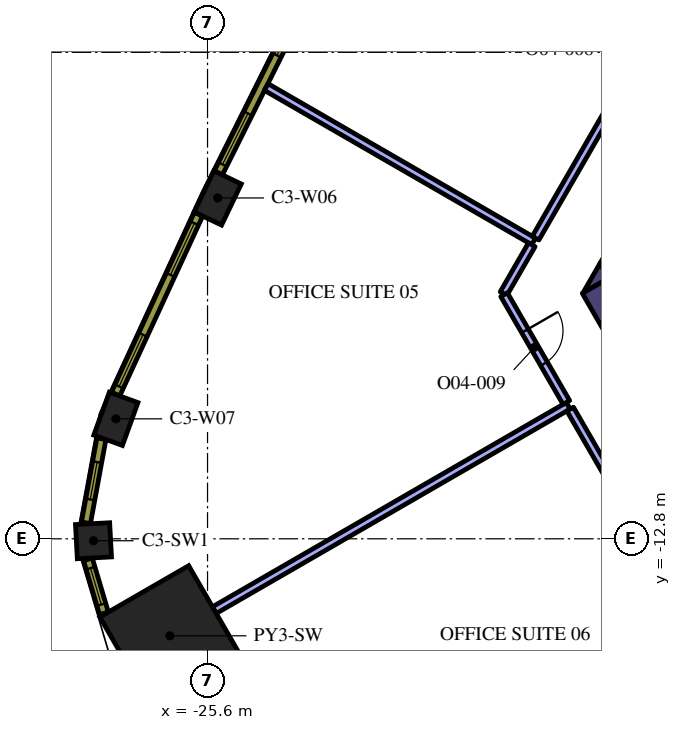
"""IFC4 building model, lengths in metres.
Left out: names, types, materials, properties, quantities, classifications, styles, units other than length and angle.
Written with IfcOpenShell. Run it as: python <this file> out.ifc"""

import sys

from ifc_helpers import new_model, si_unit, direction, frame, frame_2d, origin, origin_2d, place, context, subcontext, project, spatial, polyline, rectangle, outline, extrude, element, fill, save


model = new_model("IFC4")
c1 = context("Model", 3, precision=1e-05, world=origin(), true_north=direction((0.0, 1.0)))
c2 = subcontext(c1, "Body", "Model", "MODEL_VIEW")
j1 = project(units=[si_unit("LENGTHUNIT", "METRE"), si_unit("PLANEANGLEUNIT", "RADIAN")], contexts=[c1])
p1 = place(None, origin())
s1 = spatial("IfcSite", under=j1, at=p1, CompositionType="ELEMENT")
p2 = place(p1, origin())
s2 = spatial("IfcBuilding", under=s1, at=p2, CompositionType="ELEMENT")
p3 = place(p2, frame((0.0, 0.0, 187.8)))
s3 = spatial("IfcBuildingStorey", under=s2, at=p3, CompositionType="ELEMENT", Elevation=187.8)
p4 = place(p3, frame((-26.591, -15.352, 0.0), z_axis=(0.0, 0.0, 1.0), x_axis=(-0.866025403784, -0.5, 0.0)))
e1 = element("IfcColumn", 1, at=p4, inside=s3, PredefinedType="COLUMN", context=c2, shape_type="SweptSolid", body=[
    extrude(rectangle(XDim=2.7, YDim=2.7, at=origin_2d()), origin(), (0.0, 0.0, 1.0), 4.2),
])
for number, where, z_axis, x_axis in (
    (2, (-25.332, -3.832, 0.0), (0.0, 0.0, 1.0), (-0.433, -0.902, 0.0)),
    (3, (-28.012, -9.644, 0.0), (0.0, 0.0, 1.0), (-0.341, -0.94, 0.0)),
):
    element("IfcColumn", number, at=place(p3, frame(where, z_axis=z_axis, x_axis=x_axis)), inside=s3, PredefinedType="COLUMN", context=c2, shape_type="SweptSolid", body=[
        extrude(rectangle(XDim=1.2, YDim=0.8, at=origin_2d()), origin(), (0.0, 0.0, 1.0), 4.2),
    ])
p5 = place(p3, frame((-28.601, -12.851, 0.0), z_axis=(0.0, 0.0, 1.0), x_axis=(0.0533921468, -0.998573622053, 0.0)))
e4 = element("IfcColumn", 4, at=p5, inside=s3, PredefinedType="COLUMN", context=c2, shape_type="SweptSolid", body=[
    extrude(rectangle(XDim=0.9, YDim=0.9, at=origin_2d()), origin(), (0.0, 0.0, 1.0), 4.2),
])
p6 = place(p3, frame((-15.392, -6.14, 0.0), z_axis=(0.0, 0.0, 1.0), x_axis=(0.499984020225, -0.866034629516, 0.0)))
e5 = element("IfcWall", 5, at=p6, inside=s3, PredefinedType="SOLIDWALL", context=c2, shape_type="SweptSolid", body=[
    extrude(rectangle(XDim=3.824, YDim=0.8, at=frame_2d((1.912, 0.0))), origin(), (0.0, 0.0, 1.0), 4.2),
])
p7 = place(p3, origin())
e6 = element("IfcWall", 6, at=p7, inside=s3, PredefinedType="SOLIDWALL", context=c2, shape_type="SweptSolid", body=[
    extrude(outline(polyline([(-15.047, -5.938), (-15.719, -6.326), (-15.271, -5.55), (-15.047, -5.938)])), origin(), (0.0, 0.0, 1.0), 4.2),
])
p8 = place(p3, frame((-13.518, -3.314, 0.0), z_axis=(0.0, 0.0, 1.0), x_axis=(-0.499969377405, -0.866043083026, 0.0)))
e7 = element("IfcWall", 7, at=p8, inside=s3, PredefinedType="SOLIDWALL", context=c2, shape_type="SweptSolid", body=[
    extrude(rectangle(XDim=2.824, YDim=0.8, at=frame_2d((1.412, 0.0))), origin(), (0.0, 0.0, 1.0), 4.2),
])
e8 = element("IfcWall", 8, at=p7, inside=s3, PredefinedType="SOLIDWALL", context=c2, shape_type="SweptSolid", body=[
    extrude(outline(polyline([(-14.809, -6.35), (-15.257, -5.574), (-14.585, -5.962), (-14.809, -6.35)])), origin(), (0.0, 0.0, 1.0), 4.2),
])
p9 = place(p3, frame((-17.018, -4.976, 0.0), z_axis=(0.0, 0.0, 1.0), x_axis=(-0.866034495264, 0.499984252764, 0.0)))
e9 = element("IfcWall", 9, at=p9, inside=s3, PredefinedType="PARTITIONING", context=c2, shape_type="SweptSolid", body=[
    extrude(rectangle(XDim=8.126, YDim=0.2, at=frame_2d((4.063, 0.0))), origin(), (0.0, 0.0, 1.0), 3.15),
])
p10 = place(p3, frame((-12.374, 3.068, 0.0), z_axis=(0.0, 0.0, 1.0), x_axis=(-0.50000000053, -0.866025403479, 0.0)))
e10 = element("IfcWall", 10, at=p10, inside=s3, PredefinedType="PARTITIONING", context=c2, shape_type="SweptSolid", body=[
    extrude(rectangle(XDim=9.188, YDim=0.2, at=frame_2d((4.594, 0.0))), origin(), (0.0, 0.0, 1.0), 3.15),
])
p11 = place(p10, frame((4.1, 0.0, 0.0)))
e11 = element("IfcOpeningElement", 11, at=p11, cuts=e10, PredefinedType="OPENING", context=c2, shape_type="SweptSolid", body=[
    extrude(rectangle(XDim=1.0, YDim=2.1, at=frame_2d((0.5, 1.05))), frame((0.0, 0.11, 0.0), z_axis=(0.0, -1.0, 0.0), x_axis=(1.0, 0.0, 0.0)), (0.0, 0.0, 1.0), 0.22),
])
p12 = place(p3, frame((-16.108, -9.3, 0.0), z_axis=(0.0, 0.0, 1.0), x_axis=(-0.866027180319, -0.499996922939, 0.0)))
e12 = element("IfcWall", 12, at=p12, inside=s3, PredefinedType="PARTITIONING", context=c2, shape_type="SweptSolid", body=[
    extrude(rectangle(XDim=10.754, YDim=0.2, at=frame_2d((5.377, 0.0))), origin(), (0.0, 0.0, 1.0), 3.15),
])
p13 = place(p3, frame((-17.068, -5.062, 0.0), z_axis=(0.0, 0.0, 1.0), x_axis=(-0.499935638681, -0.86606255962, 0.0)))
e13 = element("IfcWall", 13, at=p13, inside=s3, PredefinedType="PARTITIONING", context=c2, shape_type="SweptSolid", body=[
    extrude(rectangle(XDim=1.487, YDim=0.2, at=frame_2d((0.744, 0.0))), origin(), (0.0, 0.0, 1.0), 3.15),
])
p14 = place(p3, frame((-17.796, -6.376, 0.0), z_axis=(0.0, 0.0, 1.0), x_axis=(0.500001965626, -0.866024268927, 0.0)))
e14 = element("IfcWall", 14, at=p14, inside=s3, PredefinedType="PARTITIONING", context=c2, shape_type="SweptSolid", body=[
    extrude(rectangle(XDim=3.276, YDim=0.2, at=frame_2d((1.638, 0.0))), origin(), (0.0, 0.0, 1.0), 3.15),
])
p15 = place(p14, frame((1.1, 0.0, 0.0)))
e15 = element("IfcOpeningElement", 15, at=p15, cuts=e14, PredefinedType="OPENING", context=c2, shape_type="SweptSolid", body=[
    extrude(rectangle(XDim=1.0, YDim=2.1, at=frame_2d((0.5, 1.05))), frame((0.0, 0.11, 0.0), z_axis=(0.0, -1.0, 0.0), x_axis=(1.0, 0.0, 0.0)), (0.0, 0.0, 1.0), 0.22),
])
p16 = place(p3, frame((-16.058, -9.387, 0.0), z_axis=(0.0, 0.0, 1.0), x_axis=(0.500046299512, -0.865998671098, 0.0)))
e16 = element("IfcWall", 16, at=p16, inside=s3, PredefinedType="PARTITIONING", context=c2, shape_type="SweptSolid", body=[
    extrude(rectangle(XDim=3.306, YDim=0.2, at=frame_2d((1.653, 0.0))), origin(), (0.0, 0.0, 1.0), 3.15),
])
p17 = place(p3, frame((-22.994, 1.485, 0.0), z_axis=(0.0, 0.0, 1.0), x_axis=(-0.446256171312, -0.8949052629, 0.0)))
e17 = element("IfcWall", 17, at=p17, inside=s3, PredefinedType="SOLIDWALL", context=c2, shape_type="SweptSolid", body=[
    extrude(rectangle(XDim=5.203, YDim=0.24, at=frame_2d((2.602, 0.0))), origin(), (0.0, 0.0, 1.0), 3.95),
])
p18 = place(p17, frame((0.248, 0.0, 0.9)))
e18 = element("IfcOpeningElement", 18, at=p18, cuts=e17, PredefinedType="OPENING", context=c2, shape_type="SweptSolid", body=[
    extrude(rectangle(XDim=1.5, YDim=2.55, at=frame_2d((0.75, 1.275))), frame((0.0, 0.13, 0.0), z_axis=(0.0, -1.0, 0.0), x_axis=(1.0, 0.0, 0.0)), (0.0, 0.0, 1.0), 0.26),
])
p19 = place(p17, frame((3.455, 0.0, 0.9)))
e19 = element("IfcOpeningElement", 19, at=p19, cuts=e17, PredefinedType="OPENING", context=c2, shape_type="SweptSolid", body=[
    extrude(rectangle(XDim=1.5, YDim=2.55, at=frame_2d((0.75, 1.275))), frame((0.0, 0.13, 0.0), z_axis=(0.0, -1.0, 0.0), x_axis=(1.0, 0.0, 0.0)), (0.0, 0.0, 1.0), 0.26),
])
p20 = place(p3, frame((-25.837, -4.258, 0.0), z_axis=(0.0, 0.0, 1.0), x_axis=(-0.418722559465, -0.908114209885, 0.0)))
e20 = element("IfcWall", 20, at=p20, inside=s3, PredefinedType="SOLIDWALL", context=c2, shape_type="SweptSolid", body=[
    extrude(rectangle(XDim=5.213, YDim=0.24, at=frame_2d((2.606, 0.0))), origin(), (0.0, 0.0, 1.0), 3.95),
])
p21 = place(p20, frame((0.261, 0.0, 0.9)))
e21 = element("IfcOpeningElement", 21, at=p21, cuts=e20, PredefinedType="OPENING", context=c2, shape_type="SweptSolid", body=[
    extrude(rectangle(XDim=1.5, YDim=2.55, at=frame_2d((0.75, 1.275))), frame((0.0, 0.13, 0.0), z_axis=(0.0, -1.0, 0.0), x_axis=(1.0, 0.0, 0.0)), (0.0, 0.0, 1.0), 0.26),
])
p22 = place(p20, frame((3.492, 0.0, 0.9)))
e22 = element("IfcOpeningElement", 22, at=p22, cuts=e20, PredefinedType="OPENING", context=c2, shape_type="SweptSolid", body=[
    extrude(rectangle(XDim=1.5, YDim=2.55, at=frame_2d((0.75, 1.275))), frame((0.0, 0.13, 0.0), z_axis=(0.0, -1.0, 0.0), x_axis=(1.0, 0.0, 0.0)), (0.0, 0.0, 1.0), 0.26),
])
p23 = place(p3, frame((-28.393, -10.167, 0.0), z_axis=(0.0, 0.0, 1.0), x_axis=(-0.180737189259, -0.983531427265, 0.0)))
e23 = element("IfcWall", 23, at=p23, inside=s3, PredefinedType="SOLIDWALL", context=c2, shape_type="SweptSolid", body=[
    extrude(rectangle(XDim=2.25, YDim=0.24, at=frame_2d((1.125, 0.0))), origin(), (0.0, 0.0, 1.0), 3.95),
])
p24 = place(p23, frame((0.625, 0.0, 0.9)))
e24 = element("IfcOpeningElement", 24, at=p24, cuts=e23, PredefinedType="OPENING", context=c2, shape_type="SweptSolid", body=[
    extrude(rectangle(XDim=1.0, YDim=2.55, at=frame_2d((0.5, 1.275))), frame((0.0, 0.13, 0.0), z_axis=(0.0, -1.0, 0.0), x_axis=(1.0, 0.0, 0.0)), (0.0, 0.0, 1.0), 0.26),
])
p25 = place(p3, frame((-28.748, -13.34, 0.0), z_axis=(0.0, 0.0, 1.0), x_axis=(0.284413721403, -0.958701640281, 0.0)))
e25 = element("IfcWall", 25, at=p25, inside=s3, PredefinedType="SOLIDWALL", context=c2, shape_type="SweptSolid", body=[
    extrude(rectangle(XDim=1.482, YDim=0.24, at=frame_2d((0.741, 0.0))), origin(), (0.0, 0.0, 1.0), 3.95),
])
p26 = place(p25, frame((0.241, 0.0, 0.9)))
e26 = element("IfcOpeningElement", 26, at=p26, cuts=e25, PredefinedType="OPENING", context=c2, shape_type="SweptSolid", body=[
    extrude(rectangle(XDim=1.0, YDim=2.55, at=frame_2d((0.5, 1.275))), frame((0.0, 0.13, 0.0), z_axis=(0.0, -1.0, 0.0), x_axis=(1.0, 0.0, 0.0)), (0.0, 0.0, 1.0), 0.26),
])
p27 = place(p15, origin())
e27 = element("IfcDoor", 27, at=p27, inside=s3, OperationType="SINGLE_SWING_LEFT", PredefinedType="DOOR", context=c2, shape_type="SweptSolid", body=[
    extrude(rectangle(XDim=1.0, YDim=2.1, at=frame_2d((0.5, 1.05))), frame((0.0, 0.025, 0.0), z_axis=(0.0, -1.0, 0.0), x_axis=(1.0, 0.0, 0.0)), (0.0, 0.0, 1.0), 0.05),
])
fill(e15, e27)
p28 = place(p18, origin())
e28 = element("IfcWindow", 28, at=p28, inside=s3, PartitioningType="SINGLE_PANEL", PredefinedType="WINDOW", context=c2, shape_type="SweptSolid", body=[
    extrude(rectangle(XDim=1.5, YDim=2.55, at=frame_2d((0.75, 1.275))), frame((0.0, 0.04, 0.0), z_axis=(0.0, -1.0, 0.0), x_axis=(1.0, 0.0, 0.0)), (0.0, 0.0, 1.0), 0.06),
])
fill(e18, e28)
p29 = place(p19, origin())
e29 = element("IfcWindow", 29, at=p29, inside=s3, PartitioningType="SINGLE_PANEL", PredefinedType="WINDOW", context=c2, shape_type="SweptSolid", body=[
    extrude(rectangle(XDim=1.5, YDim=2.55, at=frame_2d((0.75, 1.275))), frame((0.0, 0.04, 0.0), z_axis=(0.0, -1.0, 0.0), x_axis=(1.0, 0.0, 0.0)), (0.0, 0.0, 1.0), 0.06),
])
fill(e19, e29)
p30 = place(p21, origin())
e30 = element("IfcWindow", 30, at=p30, inside=s3, PartitioningType="SINGLE_PANEL", PredefinedType="WINDOW", context=c2, shape_type="SweptSolid", body=[
    extrude(rectangle(XDim=1.5, YDim=2.55, at=frame_2d((0.75, 1.275))), frame((0.0, 0.04, 0.0), z_axis=(0.0, -1.0, 0.0), x_axis=(1.0, 0.0, 0.0)), (0.0, 0.0, 1.0), 0.06),
])
fill(e21, e30)
p31 = place(p22, origin())
e31 = element("IfcWindow", 31, at=p31, inside=s3, PartitioningType="SINGLE_PANEL", PredefinedType="WINDOW", context=c2, shape_type="SweptSolid", body=[
    extrude(rectangle(XDim=1.5, YDim=2.55, at=frame_2d((0.75, 1.275))), frame((0.0, 0.04, 0.0), z_axis=(0.0, -1.0, 0.0), x_axis=(1.0, 0.0, 0.0)), (0.0, 0.0, 1.0), 0.06),
])
fill(e22, e31)
p32 = place(p24, origin())
e32 = element("IfcWindow", 32, at=p32, inside=s3, PartitioningType="SINGLE_PANEL", PredefinedType="WINDOW", context=c2, shape_type="SweptSolid", body=[
    extrude(rectangle(XDim=1.0, YDim=2.55, at=frame_2d((0.5, 1.275))), frame((0.0, 0.04, 0.0), z_axis=(0.0, -1.0, 0.0), x_axis=(1.0, 0.0, 0.0)), (0.0, 0.0, 1.0), 0.06),
])
fill(e24, e32)
p33 = place(p26, origin())
e33 = element("IfcWindow", 33, at=p33, inside=s3, PartitioningType="SINGLE_PANEL", PredefinedType="WINDOW", context=c2, shape_type="SweptSolid", body=[
    extrude(rectangle(XDim=1.0, YDim=2.55, at=frame_2d((0.5, 1.275))), frame((0.0, 0.04, 0.0), z_axis=(0.0, -1.0, 0.0), x_axis=(1.0, 0.0, 0.0)), (0.0, 0.0, 1.0), 0.06),
])
fill(e26, e33)
save(model, sys.argv[1])
